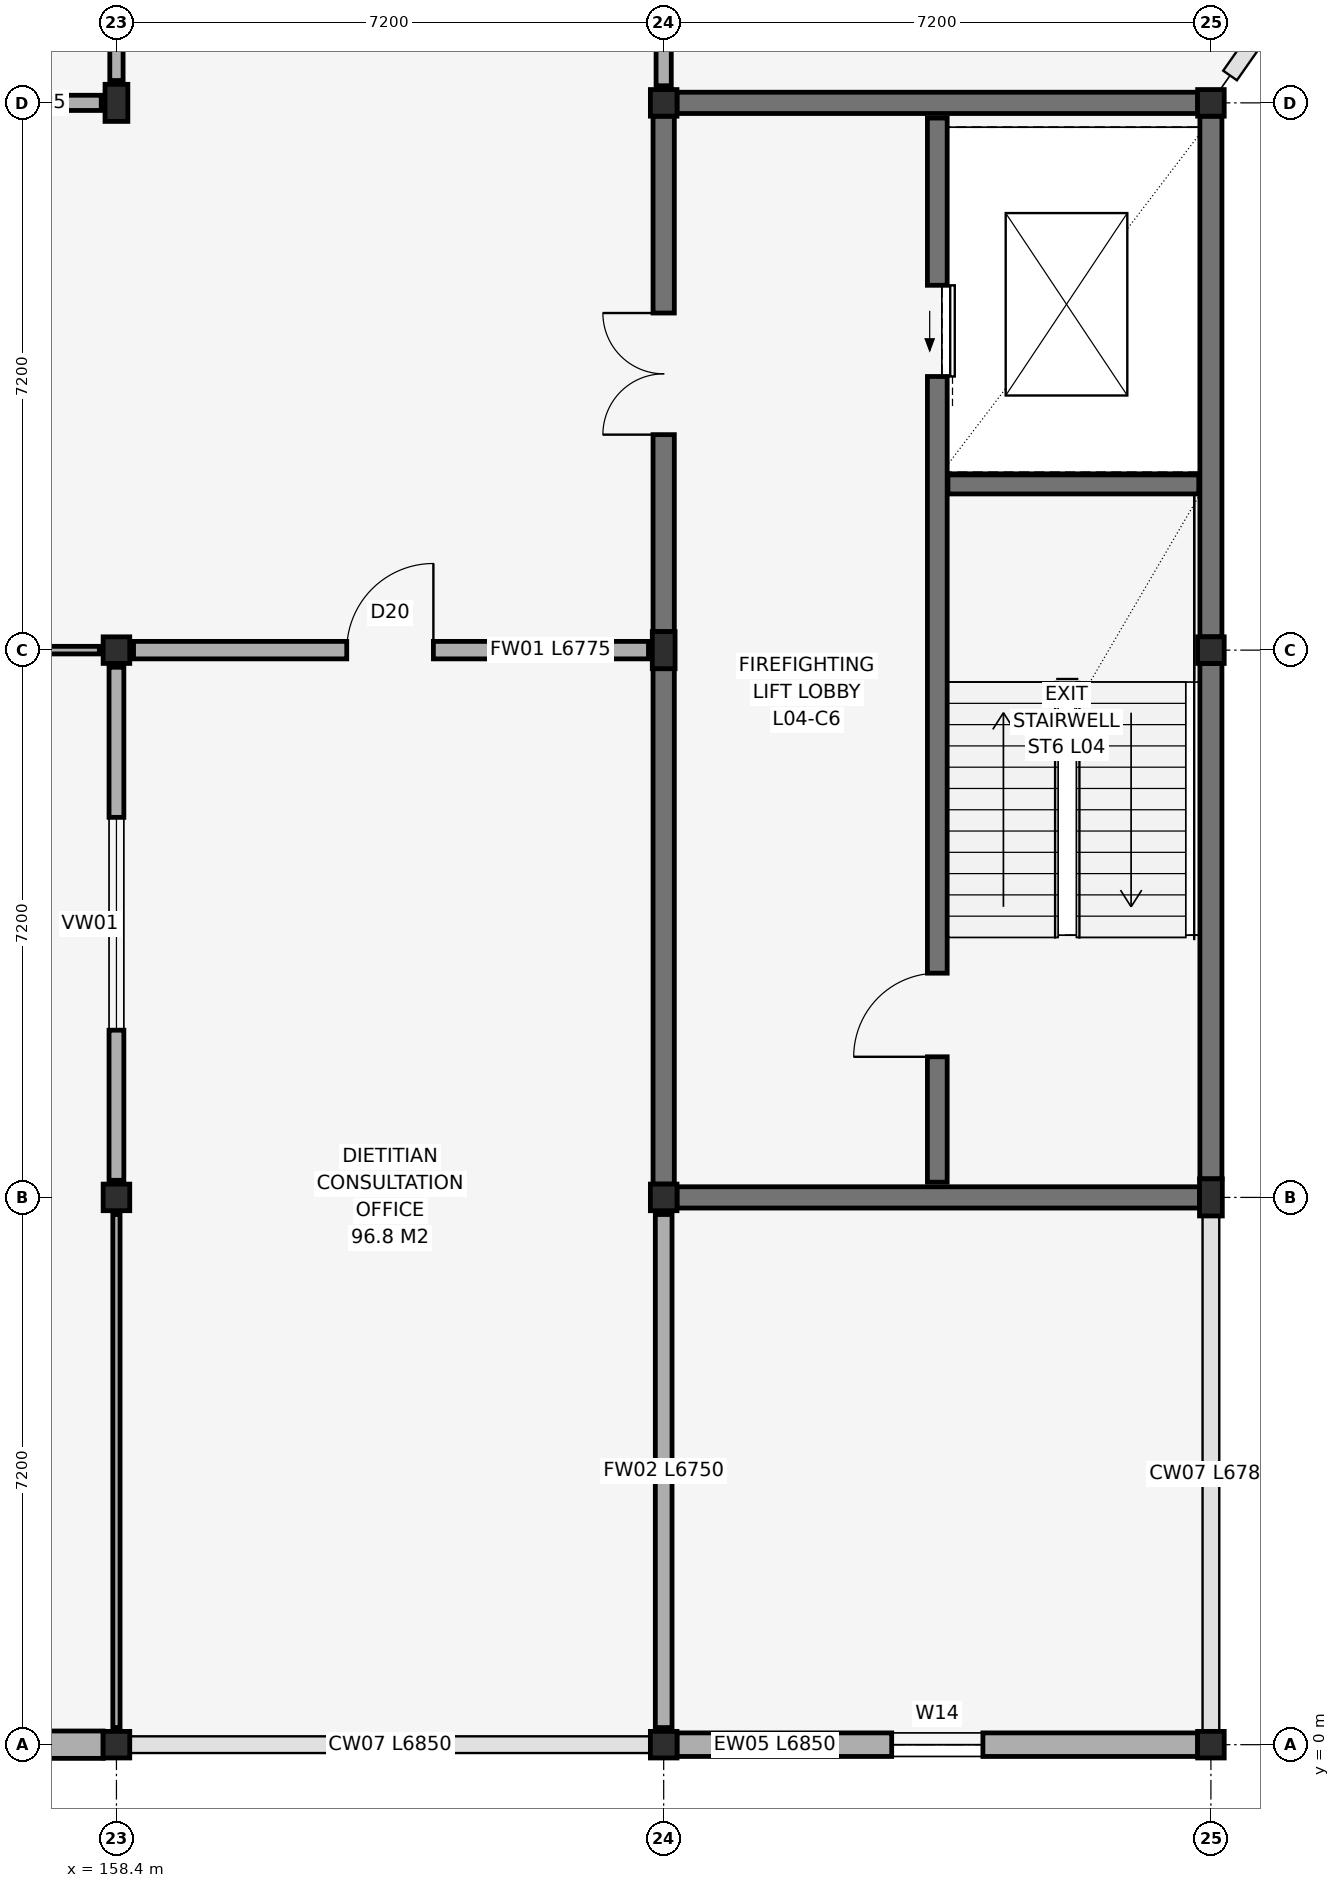
"""IFC4 building model, lengths in metres.
Left out: names, types, materials, properties, quantities, classifications, styles, units other than length and angle.
Written with IfcOpenShell. Run it as: python <this file> out.ifc"""

import sys

from ifc_helpers import new_model, si_unit, direction, frame, frame_2d, origin, origin_2d, place, context, subcontext, project, spatial, rectangle, i_section, extrude, element, fill, save


model = new_model("IFC4")
c1 = context("Model", 3, precision=1e-05, world=origin(), true_north=direction((0.0, 1.0)))
c2 = subcontext(c1, "Body", "Model", "MODEL_VIEW")
j1 = project(units=[si_unit("LENGTHUNIT", "METRE"), si_unit("PLANEANGLEUNIT", "RADIAN")], contexts=[c1])
p1 = place(None, origin())
s1 = spatial("IfcSite", under=j1, at=p1, CompositionType="ELEMENT")
p2 = place(p1, origin())
s2 = spatial("IfcBuilding", under=s1, at=p2, CompositionType="ELEMENT")
p3 = place(p2, frame((0.0, 0.0, 19.2)))
s3 = spatial("IfcBuildingStorey", under=s2, at=p3, CompositionType="ELEMENT", Elevation=19.2)
for number, where, z_axis, x_axis in (
    (1, (158.4, 0.0, 0.0), (0.0, 0.0, 1.0), (1.0, 0.0, 0.0)),
    (2, (158.4, 7.2, 0.0), (0.0, 0.0, 1.0), (1.0, 0.0, 0.0)),
    (3, (158.4, 14.4, 0.0), (0.0, 0.0, 1.0), (1.0, 0.0, 0.0)),
):
    element("IfcColumn", number, at=place(p3, frame(where, z_axis=z_axis, x_axis=x_axis)), inside=s3, PredefinedType="COLUMN", context=c2, shape_type="SweptSolid", body=[
        extrude(i_section(OverallWidth=0.35, OverallDepth=0.35, WebThickness=0.012, FlangeThickness=0.019, FilletRadius=0.02, at=origin_2d()), origin(), (0.0, 0.0, 1.0), 4.2),
    ])
p4 = place(p3, frame((158.4, 21.6, 0.0), z_axis=(0.0, 0.0, 1.0), x_axis=(1.0, 0.0, 0.0)))
e4 = element("IfcColumn", 4, at=p4, inside=s3, PredefinedType="COLUMN", context=c2, shape_type="SweptSolid", body=[
    extrude(i_section(OverallWidth=0.3, OverallDepth=0.488, WebThickness=0.011, FlangeThickness=0.018, FilletRadius=0.026, at=origin_2d()), origin(), (0.0, 0.0, 1.0), 4.2),
])
for number, where, z_axis, x_axis in (
    (5, (165.6, 0.0, 0.0), (0.0, 0.0, 1.0), (1.0, 0.0, 0.0)),
    (6, (165.6, 7.2, 0.0), (0.0, 0.0, 1.0), (1.0, 0.0, 0.0)),
):
    element("IfcColumn", number, at=place(p3, frame(where, z_axis=z_axis, x_axis=x_axis)), inside=s3, PredefinedType="COLUMN", context=c2, shape_type="SweptSolid", body=[
        extrude(i_section(OverallWidth=0.35, OverallDepth=0.35, WebThickness=0.012, FlangeThickness=0.019, FilletRadius=0.02, at=origin_2d()), origin(), (0.0, 0.0, 1.0), 4.2),
    ])
p5 = place(p3, frame((165.6, 14.4, 0.0), z_axis=(0.0, 0.0, 1.0), x_axis=(1.0, 0.0, 0.0)))
e7 = element("IfcColumn", 7, at=p5, inside=s3, PredefinedType="COLUMN", context=c2, shape_type="SweptSolid", body=[
    extrude(i_section(OverallWidth=0.3, OverallDepth=0.488, WebThickness=0.011, FlangeThickness=0.018, FilletRadius=0.026, at=origin_2d()), origin(), (0.0, 0.0, 1.0), 4.2),
])
for number, where, z_axis, x_axis in (
    (8, (165.6, 21.6, 0.0), (0.0, 0.0, 1.0), (1.0, 0.0, 0.0)),
    (9, (172.8, 0.0, 0.0), (0.0, 0.0, 1.0), (1.0, 0.0, 0.0)),
):
    element("IfcColumn", number, at=place(p3, frame(where, z_axis=z_axis, x_axis=x_axis)), inside=s3, PredefinedType="COLUMN", context=c2, shape_type="SweptSolid", body=[
        extrude(i_section(OverallWidth=0.35, OverallDepth=0.35, WebThickness=0.012, FlangeThickness=0.019, FilletRadius=0.02, at=origin_2d()), origin(), (0.0, 0.0, 1.0), 4.2),
    ])
p6 = place(p3, frame((172.8, 7.2, 0.0), z_axis=(0.0, 0.0, 1.0), x_axis=(1.0, 0.0, 0.0)))
e10 = element("IfcColumn", 10, at=p6, inside=s3, PredefinedType="COLUMN", context=c2, shape_type="SweptSolid", body=[
    extrude(i_section(OverallWidth=0.3, OverallDepth=0.488, WebThickness=0.011, FlangeThickness=0.018, FilletRadius=0.026, at=origin_2d()), origin(), (0.0, 0.0, 1.0), 4.2),
])
for number, where, z_axis, x_axis in (
    (11, (172.8, 14.4, 0.0), (0.0, 0.0, 1.0), (1.0, 0.0, 0.0)),
    (12, (172.8, 21.6, 0.0), (0.0, 0.0, 1.0), (1.0, 0.0, 0.0)),
):
    element("IfcColumn", number, at=place(p3, frame(where, z_axis=z_axis, x_axis=x_axis)), inside=s3, PredefinedType="COLUMN", context=c2, shape_type="SweptSolid", body=[
        extrude(i_section(OverallWidth=0.35, OverallDepth=0.35, WebThickness=0.012, FlangeThickness=0.019, FilletRadius=0.02, at=origin_2d()), origin(), (0.0, 0.0, 1.0), 4.2),
    ])
p7 = place(p3, frame((151.375, 0.0, 0.0), z_axis=(0.0, 0.0, 1.0), x_axis=(1.0, 0.0, 0.0)))
e13 = element("IfcWall", 13, at=p7, inside=s3, PredefinedType="SOLIDWALL", context=c2, shape_type="SweptSolid", body=[
    extrude(rectangle(XDim=6.85, YDim=0.36, at=frame_2d((3.425, 0.0))), origin(), (0.0, 0.0, 1.0), 3.18),
])
p8 = place(p7, frame((2.175, 0.0, 0.95)))
e14 = element("IfcOpeningElement", 14, at=p8, cuts=e13, PredefinedType="OPENING", context=c2, shape_type="SweptSolid", body=[
    extrude(rectangle(XDim=2.5, YDim=1.35, at=frame_2d((1.25, 0.675))), frame((0.0, 0.195, 0.0), z_axis=(0.0, -1.0, 0.0), x_axis=(1.0, 0.0, 0.0)), (0.0, 0.0, 1.0), 0.39),
])
p9 = place(p3, frame((165.775, 0.0, 0.0), z_axis=(0.0, 0.0, 1.0), x_axis=(1.0, 0.0, 0.0)))
e15 = element("IfcWall", 15, at=p9, inside=s3, PredefinedType="SOLIDWALL", context=c2, shape_type="SweptSolid", body=[
    extrude(rectangle(XDim=6.85, YDim=0.31, at=frame_2d((3.425, 0.0))), origin(), (0.0, 0.0, 1.0), 3.64),
])
p10 = place(p9, frame((2.825, 0.0, 0.95)))
e16 = element("IfcOpeningElement", 16, at=p10, cuts=e15, PredefinedType="OPENING", context=c2, shape_type="SweptSolid", body=[
    extrude(rectangle(XDim=1.2, YDim=1.75, at=frame_2d((0.6, 0.875))), frame((0.0, 0.17, 0.0), z_axis=(0.0, -1.0, 0.0), x_axis=(1.0, 0.0, 0.0)), (0.0, 0.0, 1.0), 0.34),
])
p11 = place(p3, frame((165.775, 7.2, 0.0), z_axis=(0.0, 0.0, 1.0), x_axis=(1.0, 0.0, 0.0)))
e17 = element("IfcWall", 17, at=p11, inside=s3, PredefinedType="SHEAR", context=c2, shape_type="SweptSolid", body=[
    extrude(rectangle(XDim=6.875, YDim=0.28, at=frame_2d((3.438, 0.0))), origin(), (0.0, 0.0, 1.0), 3.98),
])
p12 = place(p3, frame((165.775, 21.6, 0.0), z_axis=(0.0, 0.0, 1.0), x_axis=(1.0, 0.0, 0.0)))
e18 = element("IfcWall", 18, at=p12, inside=s3, PredefinedType="SHEAR", context=c2, shape_type="SweptSolid", body=[
    extrude(rectangle(XDim=6.85, YDim=0.28, at=frame_2d((3.425, 0.0))), origin(), (0.0, 0.0, 1.0), 3.98),
])
p13 = place(p3, frame((165.6, 7.375, 0.0), z_axis=(0.0, 0.0, 1.0), x_axis=(0.0, 1.0, 0.0)))
e19 = element("IfcWall", 19, at=p13, inside=s3, PredefinedType="SHEAR", context=c2, shape_type="SweptSolid", body=[
    extrude(rectangle(XDim=6.781, YDim=0.28, at=frame_2d((3.391, 0.0))), origin(), (0.0, 0.0, 1.0), 3.98),
])
p14 = place(p3, frame((165.6, 14.644, 0.0), z_axis=(0.0, 0.0, 1.0), x_axis=(0.0, 1.0, 0.0)))
e20 = element("IfcWall", 20, at=p14, inside=s3, PredefinedType="SHEAR", context=c2, shape_type="SweptSolid", body=[
    extrude(rectangle(XDim=6.781, YDim=0.28, at=frame_2d((3.391, 0.0))), origin(), (0.0, 0.0, 1.0), 3.98),
])
p15 = place(p14, frame((2.591, 0.0, 0.0)))
e21 = element("IfcOpeningElement", 21, at=p15, cuts=e20, PredefinedType="OPENING", context=c2, shape_type="SweptSolid", body=[
    extrude(rectangle(XDim=1.6, YDim=2.2, at=frame_2d((0.8, 1.1))), frame((0.0, 0.155, 0.0), z_axis=(0.0, -1.0, 0.0), x_axis=(1.0, 0.0, 0.0)), (0.0, 0.0, 1.0), 0.31),
])
p16 = place(p3, frame((172.8, 7.444, 0.0), z_axis=(0.0, 0.0, 1.0), x_axis=(0.0, 1.0, 0.0)))
e22 = element("IfcWall", 22, at=p16, inside=s3, PredefinedType="SHEAR", context=c2, shape_type="SweptSolid", body=[
    extrude(rectangle(XDim=6.781, YDim=0.29, at=frame_2d((3.391, 0.0))), origin(), (0.0, 0.0, 1.0), 3.98),
])
p17 = place(p3, frame((172.8, 14.575, 0.0), z_axis=(0.0, 0.0, 1.0), x_axis=(0.0, 1.0, 0.0)))
e23 = element("IfcWall", 23, at=p17, inside=s3, PredefinedType="SHEAR", context=c2, shape_type="SweptSolid", body=[
    extrude(rectangle(XDim=6.85, YDim=0.29, at=frame_2d((3.425, 0.0))), origin(), (0.0, 0.0, 1.0), 3.98),
])
p18 = place(p3, frame((169.2, 7.4, 0.0), z_axis=(0.0, 0.0, 1.0), x_axis=(0.0, 1.0, 0.0)))
e24 = element("IfcWall", 24, at=p18, inside=s3, PredefinedType="SHEAR", context=c2, shape_type="SweptSolid", body=[
    extrude(rectangle(XDim=14.0, YDim=0.26, at=frame_2d((7.0, 0.0))), origin(), (0.0, 0.0, 1.0), 3.98),
])
p19 = place(p18, frame((1.65, 0.0, 0.0)))
e25 = element("IfcOpeningElement", 25, at=p19, cuts=e24, PredefinedType="OPENING", context=c2, shape_type="SweptSolid", body=[
    extrude(rectangle(XDim=1.1, YDim=2.15, at=frame_2d((0.55, 1.075))), frame((0.0, 0.145, 0.0), z_axis=(0.0, -1.0, 0.0), x_axis=(1.0, 0.0, 0.0)), (0.0, 0.0, 1.0), 0.29),
])
p20 = place(p18, frame((10.6, 0.0, 0.0)))
e26 = element("IfcOpeningElement", 26, at=p20, cuts=e24, PredefinedType="OPENING", context=c2, shape_type="SweptSolid", body=[
    extrude(rectangle(XDim=1.2, YDim=2.25, at=frame_2d((0.6, 1.125))), frame((0.0, 0.145, 0.0), z_axis=(0.0, -1.0, 0.0), x_axis=(1.0, 0.0, 0.0)), (0.0, 0.0, 1.0), 0.29),
])
p21 = place(p3, frame((169.34, 16.58, 0.0), z_axis=(0.0, 0.0, 1.0), x_axis=(1.0, 0.0, 0.0)))
e27 = element("IfcWall", 27, at=p21, inside=s3, PredefinedType="SHEAR", context=c2, shape_type="SweptSolid", body=[
    extrude(rectangle(XDim=3.3, YDim=0.25, at=frame_2d((1.65, 0.0))), origin(), (0.0, 0.0, 1.0), 3.98),
])
p22 = place(p3, frame((151.425, 14.4, 0.0), z_axis=(0.0, 0.0, 1.0), x_axis=(1.0, 0.0, 0.0)))
e28 = element("IfcWall", 28, at=p22, inside=s3, PredefinedType="PARTITIONING", context=c2, shape_type="SweptSolid", body=[
    extrude(rectangle(XDim=6.75, YDim=0.1, at=frame_2d((3.375, 0.0))), origin(), (0.0, 0.0, 1.0), 3.64),
])
p23 = place(p22, frame((2.575, 0.0, 0.95)))
e29 = element("IfcOpeningElement", 29, at=p23, cuts=e28, PredefinedType="OPENING", context=c2, shape_type="SweptSolid", body=[
    extrude(rectangle(XDim=1.6, YDim=1.2, at=frame_2d((0.8, 0.6))), frame((0.0, 0.065, 0.0), z_axis=(0.0, -1.0, 0.0), x_axis=(1.0, 0.0, 0.0)), (0.0, 0.0, 1.0), 0.13),
])
p24 = place(p3, frame((158.4, 0.225, 0.0), z_axis=(0.0, 0.0, 1.0), x_axis=(0.0, 1.0, 0.0)))
e30 = element("IfcWall", 30, at=p24, inside=s3, PredefinedType="PARTITIONING", context=c2, shape_type="SweptSolid", body=[
    extrude(rectangle(XDim=6.75, YDim=0.095, at=frame_2d((3.375, 0.0))), origin(), (0.0, 0.0, 1.0), 3.64),
])
p25 = place(p3, frame((158.4, 7.425, 0.0), z_axis=(0.0, 0.0, 1.0), x_axis=(0.0, 1.0, 0.0)))
e31 = element("IfcWall", 31, at=p25, inside=s3, PredefinedType="PARTITIONING", context=c2, shape_type="SweptSolid", body=[
    extrude(rectangle(XDim=6.75, YDim=0.195, at=frame_2d((3.375, 0.0))), origin(), (0.0, 0.0, 1.0), 3.64),
])
p26 = place(p25, frame((1.975, 0.0, 0.95)))
e32 = element("IfcOpeningElement", 32, at=p26, cuts=e31, PredefinedType="OPENING", context=c2, shape_type="SweptSolid", body=[
    extrude(rectangle(XDim=2.8, YDim=1.5, at=frame_2d((1.4, 0.75))), frame((0.0, 0.112, 0.0), z_axis=(0.0, -1.0, 0.0), x_axis=(1.0, 0.0, 0.0)), (0.0, 0.0, 1.0), 0.225),
])
p27 = place(p3, frame((158.625, 14.4, 0.0), z_axis=(0.0, 0.0, 1.0), x_axis=(1.0, 0.0, 0.0)))
e33 = element("IfcWall", 33, at=p27, inside=s3, PredefinedType="SOLIDWALL", context=c2, shape_type="SweptSolid", body=[
    extrude(rectangle(XDim=6.775, YDim=0.23, at=frame_2d((3.387, 0.0))), origin(), (0.0, 0.0, 1.0), 3.64),
])
p28 = place(p27, frame((2.805, 0.0, 0.0)))
e34 = element("IfcOpeningElement", 34, at=p28, cuts=e33, PredefinedType="OPENING", context=c2, shape_type="SweptSolid", body=[
    extrude(rectangle(XDim=1.14, YDim=2.15, at=frame_2d((0.57, 1.075))), frame((0.0, 0.13, 0.0), z_axis=(0.0, -1.0, 0.0), x_axis=(1.0, 0.0, 0.0)), (0.0, 0.0, 1.0), 0.26),
])
p29 = place(p3, frame((165.6, 0.225, 0.0), z_axis=(0.0, 0.0, 1.0), x_axis=(0.0, 1.0, 0.0)))
e35 = element("IfcWall", 35, at=p29, inside=s3, PredefinedType="SOLIDWALL", context=c2, shape_type="SweptSolid", body=[
    extrude(rectangle(XDim=6.75, YDim=0.22, at=frame_2d((3.375, 0.0))), origin(), (0.0, 0.0, 1.0), 3.64),
])
p30 = place(p3, frame((151.425, 21.6, 0.0), z_axis=(0.0, 0.0, 1.0), x_axis=(1.0, 0.0, 0.0)))
e36 = element("IfcWall", 36, at=p30, inside=s3, PredefinedType="SOLIDWALL", context=c2, shape_type="SweptSolid", body=[
    extrude(rectangle(XDim=6.775, YDim=0.2, at=frame_2d((3.387, 0.0))), origin(), (0.0, 0.0, 1.0), 3.64),
])
p31 = place(p30, frame((2.915, 0.0, 0.0)))
e37 = element("IfcOpeningElement", 37, at=p31, cuts=e36, PredefinedType="OPENING", context=c2, shape_type="SweptSolid", body=[
    extrude(rectangle(XDim=0.92, YDim=2.1, at=frame_2d((0.46, 1.05))), frame((0.0, 0.115, 0.0), z_axis=(0.0, -1.0, 0.0), x_axis=(1.0, 0.0, 0.0)), (0.0, 0.0, 1.0), 0.23),
])
p32 = place(p3, frame((158.4, 21.894, 0.0), z_axis=(0.0, 0.0, 1.0), x_axis=(0.0, 1.0, 0.0)))
e38 = element("IfcWall", 38, at=p32, inside=s3, PredefinedType="PARTITIONING", context=c2, shape_type="SweptSolid", body=[
    extrude(rectangle(XDim=6.681, YDim=0.175, at=frame_2d((3.34, 0.0))), origin(), (0.0, 0.0, 1.0), 3.64),
])
p33 = place(p3, frame((165.6, 21.825, 0.0), z_axis=(0.0, 0.0, 1.0), x_axis=(0.0, 1.0, 0.0)))
e39 = element("IfcWall", 39, at=p33, inside=s3, PredefinedType="SOLIDWALL", context=c2, shape_type="SweptSolid", body=[
    extrude(rectangle(XDim=6.75, YDim=0.2, at=frame_2d((3.375, 0.0))), origin(), (0.0, 0.0, 1.0), 3.64),
])
p34 = place(p33, frame((2.875, 0.0, 0.0)))
e40 = element("IfcOpeningElement", 40, at=p34, cuts=e39, PredefinedType="OPENING", context=c2, shape_type="SweptSolid", body=[
    extrude(rectangle(XDim=1.0, YDim=2.1, at=frame_2d((0.5, 1.05))), frame((0.0, 0.115, 0.0), z_axis=(0.0, -1.0, 0.0), x_axis=(1.0, 0.0, 0.0)), (0.0, 0.0, 1.0), 0.23),
])
p35 = place(p10, origin())
e41 = element("IfcWindow", 41, at=p35, inside=s3, PartitioningType="SINGLE_PANEL", PredefinedType="WINDOW", context=c2, shape_type="SweptSolid", body=[
    extrude(rectangle(XDim=1.2, YDim=1.75, at=frame_2d((0.6, 0.875))), frame((0.0, 0.03, 0.0), z_axis=(0.0, -1.0, 0.0), x_axis=(1.0, 0.0, 0.0)), (0.0, 0.0, 1.0), 0.06),
])
fill(e16, e41)
p36 = place(p19, frame((1.1, 0.0, 0.0), z_axis=(0.0, 0.0, 1.0), x_axis=(-1.0, 0.0, 0.0)))
e42 = element("IfcDoor", 42, at=p36, inside=s3, OperationType="SINGLE_SWING_RIGHT", PredefinedType="DOOR", context=c2, shape_type="SweptSolid", body=[
    extrude(rectangle(XDim=1.1, YDim=2.15, at=frame_2d((0.55, 1.075))), frame((0.0, 0.025, 0.0), z_axis=(0.0, -1.0, 0.0), x_axis=(1.0, 0.0, 0.0)), (0.0, 0.0, 1.0), 0.05),
])
fill(e25, e42)
p37 = place(p20, origin())
e43 = element("IfcDoor", 43, at=p37, inside=s3, OperationType="SLIDING_TO_LEFT", PredefinedType="DOOR", context=c2, shape_type="SweptSolid", body=[
    extrude(rectangle(XDim=1.2, YDim=2.25, at=frame_2d((0.6, 1.125))), frame((0.0, 0.025, 0.0), z_axis=(0.0, -1.0, 0.0), x_axis=(1.0, 0.0, 0.0)), (0.0, 0.0, 1.0), 0.05),
])
fill(e26, e43)
p38 = place(p15, origin())
e44 = element("IfcDoor", 44, at=p38, inside=s3, OperationType="DOUBLE_SWING_LEFT", PredefinedType="DOOR", context=c2, shape_type="SweptSolid", body=[
    extrude(rectangle(XDim=1.6, YDim=2.2, at=frame_2d((0.8, 1.1))), frame((0.0, 0.025, 0.0), z_axis=(0.0, -1.0, 0.0), x_axis=(1.0, 0.0, 0.0)), (0.0, 0.0, 1.0), 0.05),
])
fill(e21, e44)
p39 = place(p26, origin())
e45 = element("IfcWindow", 45, at=p39, inside=s3, PartitioningType="SINGLE_PANEL", PredefinedType="WINDOW", context=c2, shape_type="SweptSolid", body=[
    extrude(rectangle(XDim=2.8, YDim=1.5, at=frame_2d((1.4, 0.75))), frame((0.0, 0.03, 0.0), z_axis=(0.0, -1.0, 0.0), x_axis=(1.0, 0.0, 0.0)), (0.0, 0.0, 1.0), 0.06),
])
fill(e32, e45)
p40 = place(p28, frame((1.14, 0.0, 0.0), z_axis=(0.0, 0.0, 1.0), x_axis=(-1.0, 0.0, 0.0)))
e46 = element("IfcDoor", 46, at=p40, inside=s3, OperationType="SINGLE_SWING_LEFT", PredefinedType="DOOR", context=c2, shape_type="SweptSolid", body=[
    extrude(rectangle(XDim=1.14, YDim=2.15, at=frame_2d((0.57, 1.075))), frame((0.0, 0.025, 0.0), z_axis=(0.0, -1.0, 0.0), x_axis=(1.0, 0.0, 0.0)), (0.0, 0.0, 1.0), 0.05),
])
fill(e34, e46)
save(model, sys.argv[1])
